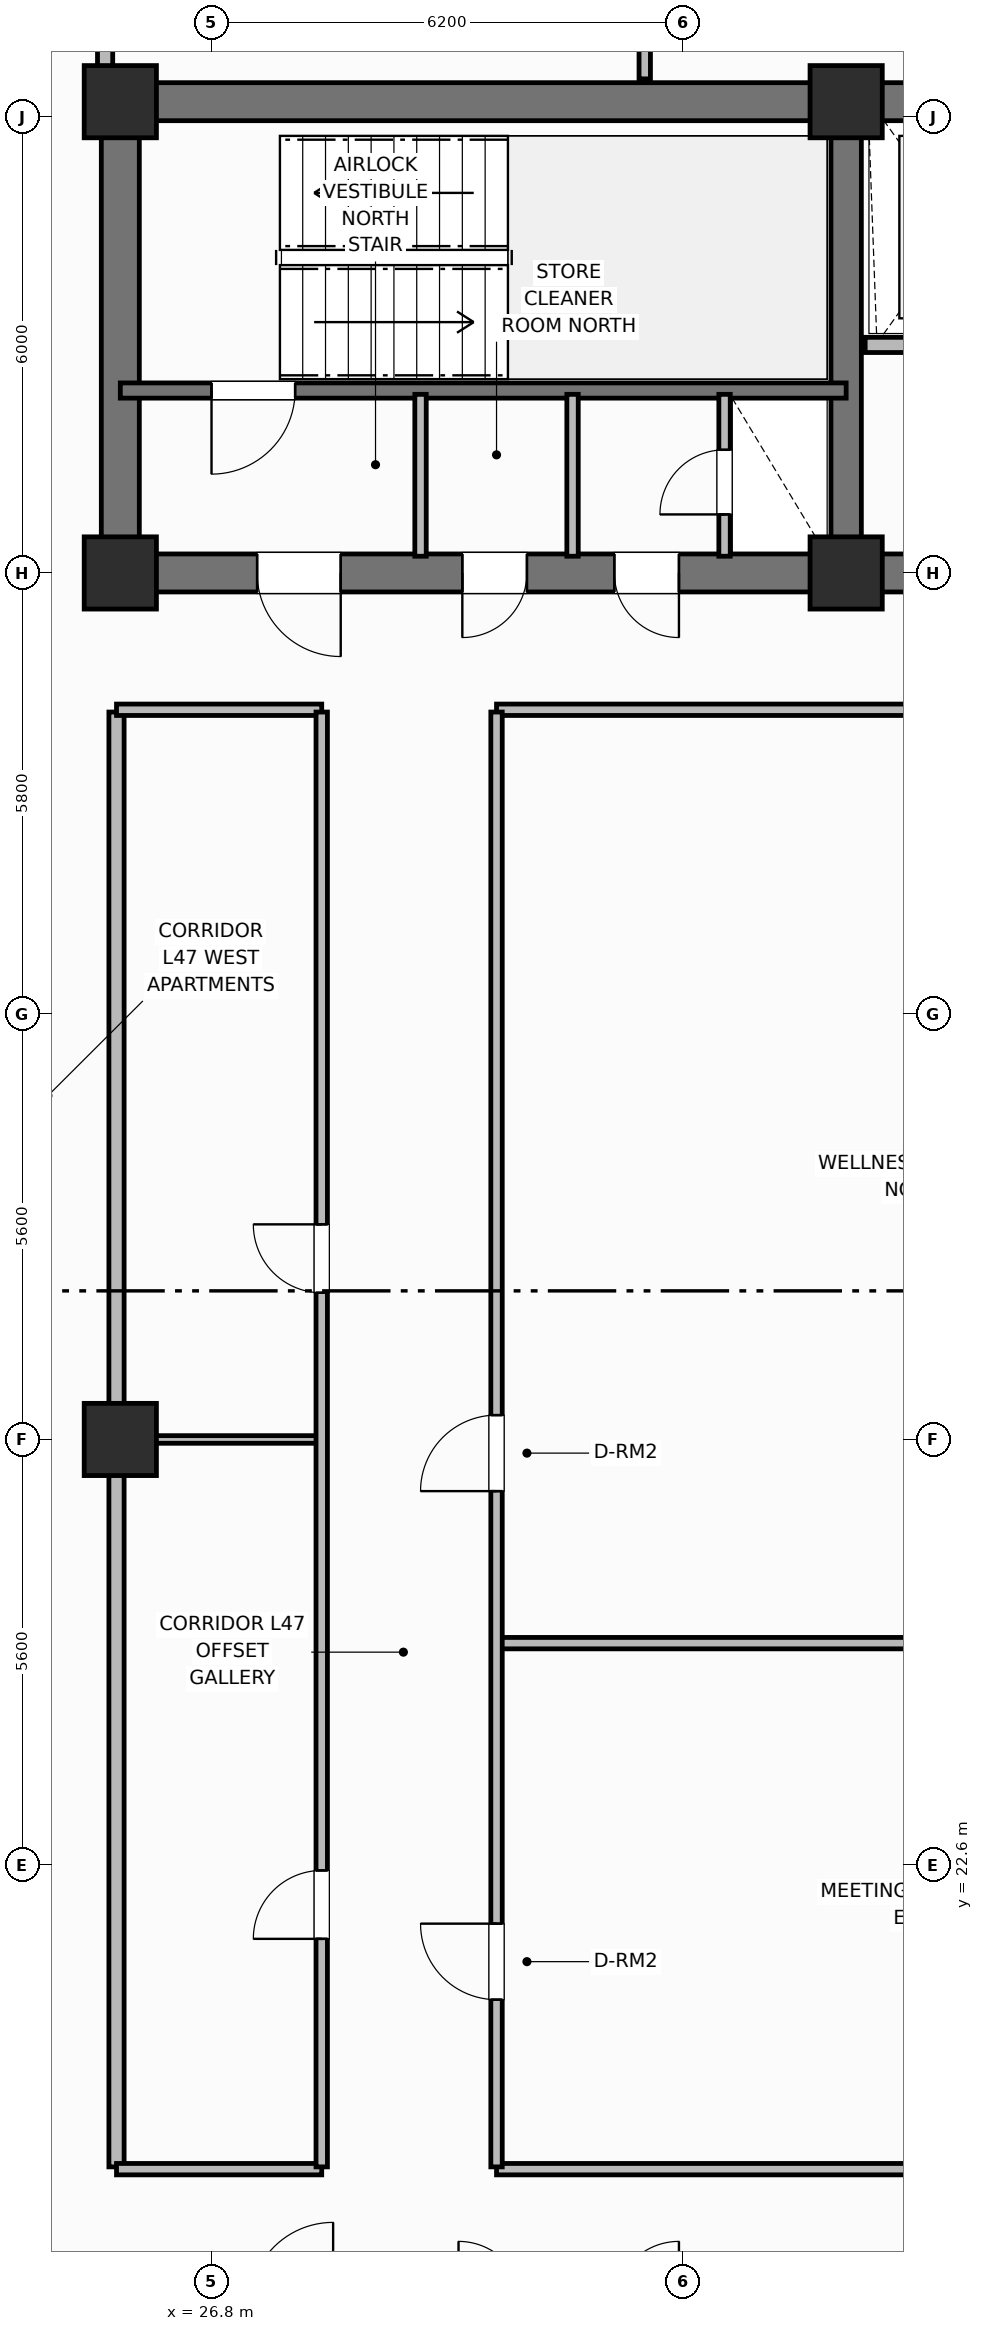
"""IFC4 building model, lengths in metres.
Left out: names, types, materials, properties, quantities, classifications, styles, units other than length and angle.
Written with IfcOpenShell. Run it as: python <this file> out.ifc"""

import sys

from ifc_helpers import new_model, si_unit, direction, frame, frame_2d, origin, origin_2d, place, context, subcontext, project, spatial, rectangle, extrude, element, fill, save


model = new_model("IFC4")
c1 = context("Model", 3, precision=1e-05, world=origin(), true_north=direction((0.0, 1.0)))
c2 = subcontext(c1, "Body", "Model", "MODEL_VIEW")
j1 = project(units=[si_unit("LENGTHUNIT", "METRE"), si_unit("PLANEANGLEUNIT", "RADIAN")], contexts=[c1])
p1 = place(None, origin())
s1 = spatial("IfcSite", under=j1, at=p1, CompositionType="ELEMENT")
p2 = place(p1, origin())
s2 = spatial("IfcBuilding", under=s1, at=p2, CompositionType="ELEMENT")
p3 = place(p2, frame((0.0, 0.0, 188.5)))
s3 = spatial("IfcBuildingStorey", under=s2, at=p3, CompositionType="ELEMENT", Elevation=188.5)
p4 = place(p3, frame((25.6, 45.8, 0.0), z_axis=(0.0, 0.0, 1.0), x_axis=(1.0, 0.0, 0.0)))
e1 = element("IfcWall", 1, at=p4, inside=s3, PredefinedType="SHEAR", context=c2, shape_type="SweptSolid", body=[
    extrude(rectangle(XDim=27.2, YDim=0.5, at=frame_2d((13.6, 0.0))), origin(), (0.0, 0.0, 1.0), 3.7),
])
p5 = place(p3, frame((25.6, 39.85, 0.0), z_axis=(0.0, 0.0, 1.0), x_axis=(0.0, 1.0, 0.0)))
e2 = element("IfcWall", 2, at=p5, inside=s3, PredefinedType="SHEAR", context=c2, shape_type="SweptSolid", body=[
    extrude(rectangle(XDim=5.7, YDim=0.5, at=frame_2d((2.85, 0.0))), origin(), (0.0, 0.0, 1.0), 3.7),
])
p6 = place(p3, frame((52.8, 39.6, 0.0), z_axis=(0.0, 0.0, 1.0), x_axis=(-1.0, 0.0, 0.0)))
e3 = element("IfcWall", 3, at=p6, inside=s3, PredefinedType="SHEAR", context=c2, shape_type="SweptSolid", body=[
    extrude(rectangle(XDim=27.2, YDim=0.5, at=frame_2d((13.6, 0.0))), origin(), (0.0, 0.0, 1.0), 3.7),
])
p7 = place(p6, frame((24.3, 0.0, 0.0)))
e4 = element("IfcOpeningElement", 4, at=p7, cuts=e3, PredefinedType="OPENING", context=c2, shape_type="SweptSolid", body=[
    extrude(rectangle(XDim=1.1, YDim=2.15, at=frame_2d((0.55, 1.075))), frame((0.0, 0.26, 0.0), z_axis=(0.0, -1.0, 0.0), x_axis=(1.0, 0.0, 0.0)), (0.0, 0.0, 1.0), 0.52),
])
p8 = place(p6, frame((21.85, 0.0, 0.0)))
e5 = element("IfcOpeningElement", 5, at=p8, cuts=e3, PredefinedType="OPENING", context=c2, shape_type="SweptSolid", body=[
    extrude(rectangle(XDim=0.85, YDim=2.1, at=frame_2d((0.425, 1.05))), frame((0.0, 0.26, 0.0), z_axis=(0.0, -1.0, 0.0), x_axis=(1.0, 0.0, 0.0)), (0.0, 0.0, 1.0), 0.52),
])
p9 = place(p6, frame((19.85, 0.0, 0.0)))
e6 = element("IfcOpeningElement", 6, at=p9, cuts=e3, PredefinedType="OPENING", context=c2, shape_type="SweptSolid", body=[
    extrude(rectangle(XDim=0.85, YDim=2.1, at=frame_2d((0.425, 1.05))), frame((0.0, 0.26, 0.0), z_axis=(0.0, -1.0, 0.0), x_axis=(1.0, 0.0, 0.0)), (0.0, 0.0, 1.0), 0.52),
])
p10 = place(p6, frame((15.1, 0.0, 0.0)))
e7 = element("IfcOpeningElement", 7, at=p10, cuts=e3, PredefinedType="OPENING", context=c2, shape_type="SweptSolid", body=[
    extrude(rectangle(XDim=1.2, YDim=2.15, at=frame_2d((0.6, 1.075))), frame((0.0, 0.26, 0.0), z_axis=(0.0, -1.0, 0.0), x_axis=(1.0, 0.0, 0.0)), (0.0, 0.0, 1.0), 0.52),
])
p11 = place(p6, frame((12.6, 0.0, 0.0)))
e8 = element("IfcOpeningElement", 8, at=p11, cuts=e3, PredefinedType="OPENING", context=c2, shape_type="SweptSolid", body=[
    extrude(rectangle(XDim=0.85, YDim=2.1, at=frame_2d((0.425, 1.05))), frame((0.0, 0.26, 0.0), z_axis=(0.0, -1.0, 0.0), x_axis=(1.0, 0.0, 0.0)), (0.0, 0.0, 1.0), 0.52),
])
p12 = place(p6, frame((10.85, 0.0, 0.0)))
e9 = element("IfcOpeningElement", 9, at=p12, cuts=e3, PredefinedType="OPENING", context=c2, shape_type="SweptSolid", body=[
    extrude(rectangle(XDim=0.85, YDim=2.1, at=frame_2d((0.425, 1.05))), frame((0.0, 0.26, 0.0), z_axis=(0.0, -1.0, 0.0), x_axis=(1.0, 0.0, 0.0)), (0.0, 0.0, 1.0), 0.52),
])
p13 = place(p6, frame((7.35, 0.0, 0.0)))
e10 = element("IfcOpeningElement", 10, at=p13, cuts=e3, PredefinedType="OPENING", context=c2, shape_type="SweptSolid", body=[
    extrude(rectangle(XDim=0.85, YDim=2.1, at=frame_2d((0.425, 1.05))), frame((0.0, 0.26, 0.0), z_axis=(0.0, -1.0, 0.0), x_axis=(1.0, 0.0, 0.0)), (0.0, 0.0, 1.0), 0.52),
])
p14 = place(p6, frame((5.35, 0.0, 0.0)))
e11 = element("IfcOpeningElement", 11, at=p14, cuts=e3, PredefinedType="OPENING", context=c2, shape_type="SweptSolid", body=[
    extrude(rectangle(XDim=0.85, YDim=2.1, at=frame_2d((0.425, 1.05))), frame((0.0, 0.26, 0.0), z_axis=(0.0, -1.0, 0.0), x_axis=(1.0, 0.0, 0.0)), (0.0, 0.0, 1.0), 0.52),
])
p15 = place(p6, frame((2.0, 0.0, 0.0)))
e12 = element("IfcOpeningElement", 12, at=p15, cuts=e3, PredefinedType="OPENING", context=c2, shape_type="SweptSolid", body=[
    extrude(rectangle(XDim=0.85, YDim=2.1, at=frame_2d((0.425, 1.05))), frame((0.0, 0.26, 0.0), z_axis=(0.0, -1.0, 0.0), x_axis=(1.0, 0.0, 0.0)), (0.0, 0.0, 1.0), 0.52),
])
p16 = place(p3, frame((35.15, 39.85, 0.0), z_axis=(0.0, 0.0, 1.0), x_axis=(0.0, 1.0, 0.0)))
e13 = element("IfcWall", 13, at=p16, inside=s3, PredefinedType="SHEAR", context=c2, shape_type="SweptSolid", body=[
    extrude(rectangle(XDim=5.7, YDim=0.4, at=frame_2d((2.85, 0.0))), origin(), (0.0, 0.0, 1.0), 3.7),
])
for number, where, z_axis, x_axis in (
    (14, (25.6, 39.6, 0.0), (0.0, 0.0, 1.0), (1.0, 0.0, 0.0)),
    (15, (25.6, 45.8, 0.0), (0.0, 0.0, 1.0), (1.0, 0.0, 0.0)),
    (16, (35.15, 39.6, 0.0), (0.0, 0.0, 1.0), (1.0, 0.0, 0.0)),
    (17, (35.15, 45.8, 0.0), (0.0, 0.0, 1.0), (1.0, 0.0, 0.0)),
    (18, (25.6, 28.2, 0.0), (0.0, 0.0, 1.0), (1.0, 0.0, 0.0)),
):
    element("IfcColumn", number, at=place(p3, frame(where, z_axis=z_axis, x_axis=x_axis)), inside=s3, PredefinedType="COLUMN", context=c2, shape_type="SweptSolid", body=[
        extrude(rectangle(XDim=0.95, YDim=0.95, at=origin_2d()), origin(), (0.0, 0.0, 1.0), 3.7),
    ])
p17 = place(p3, frame((35.15, 42.0, 0.0), z_axis=(0.0, 0.0, 1.0), x_axis=(-1.0, 0.0, 0.0)))
e19 = element("IfcWall", 19, at=p17, inside=s3, PredefinedType="SHEAR", context=c2, shape_type="SweptSolid", body=[
    extrude(rectangle(XDim=9.55, YDim=0.2, at=frame_2d((4.775, 0.0))), origin(), (0.0, 0.0, 1.0), 3.7),
])
p18 = place(p17, frame((7.25, 0.0, 0.0)))
e20 = element("IfcOpeningElement", 20, at=p18, cuts=e19, PredefinedType="OPENING", context=c2, shape_type="SweptSolid", body=[
    extrude(rectangle(XDim=1.1, YDim=2.15, at=frame_2d((0.55, 1.075))), frame((0.0, 0.11, 0.0), z_axis=(0.0, -1.0, 0.0), x_axis=(1.0, 0.0, 0.0)), (0.0, 0.0, 1.0), 0.22),
])
p19 = place(p3, frame((33.55, 39.82, 0.0), z_axis=(0.0, 0.0, 1.0), x_axis=(0.0, 1.0, 0.0)))
e21 = element("IfcWall", 21, at=p19, inside=s3, PredefinedType="PARTITIONING", context=c2, shape_type="SweptSolid", body=[
    extrude(rectangle(XDim=2.13, YDim=0.15, at=frame_2d((1.065, 0.0))), origin(), (0.0, 0.0, 1.0), 2.55),
])
p20 = place(p19, frame((0.55, 0.0, 0.0)))
e22 = element("IfcOpeningElement", 22, at=p20, cuts=e21, PredefinedType="OPENING", context=c2, shape_type="SweptSolid", body=[
    extrude(rectangle(XDim=0.85, YDim=2.05, at=frame_2d((0.425, 1.025))), frame((0.0, 0.085, 0.0), z_axis=(0.0, -1.0, 0.0), x_axis=(1.0, 0.0, 0.0)), (0.0, 0.0, 1.0), 0.17),
])
for number, where, z_axis, x_axis in (
    (23, (29.55, 39.82, 0.0), (0.0, 0.0, 1.0), (0.0, 1.0, 0.0)),
    (24, (31.55, 39.82, 0.0), (0.0, 0.0, 1.0), (0.0, 1.0, 0.0)),
):
    element("IfcWall", number, at=place(p3, frame(where, z_axis=z_axis, x_axis=x_axis)), inside=s3, PredefinedType="PARTITIONING", context=c2, shape_type="SweptSolid", body=[
        extrude(rectangle(XDim=2.13, YDim=0.15, at=frame_2d((1.065, 0.0))), origin(), (0.0, 0.0, 1.0), 2.55),
    ])
p21 = place(p3, frame((37.95, 42.6, 0.0), z_axis=(0.0, 0.0, 1.0), x_axis=(-1.0, 0.0, 0.0)))
e25 = element("IfcWall", 25, at=p21, inside=s3, PredefinedType="PARTITIONING", context=c2, shape_type="SweptSolid", body=[
    extrude(rectangle(XDim=2.55, YDim=0.2, at=frame_2d((1.275, 0.0))), origin(), (0.0, 0.0, 1.0), 2.32),
])
p22 = place(p21, frame((0.75, 0.0, 0.0)))
e26 = element("IfcOpeningElement", 26, at=p22, cuts=e25, PredefinedType="OPENING", context=c2, shape_type="SweptSolid", body=[
    extrude(rectangle(XDim=1.1, YDim=2.15, at=frame_2d((0.55, 1.075))), frame((0.0, 0.11, 0.0), z_axis=(0.0, -1.0, 0.0), x_axis=(1.0, 0.0, 0.0)), (0.0, 0.0, 1.0), 0.22),
])
p23 = place(p3, frame((25.55, 18.63, 0.0), z_axis=(0.0, 0.0, 1.0), x_axis=(0.0, 1.0, 0.0)))
e27 = element("IfcWall", 27, at=p23, inside=s3, PredefinedType="PARTITIONING", context=c2, shape_type="SweptSolid", body=[
    extrude(rectangle(XDim=19.14, YDim=0.2, at=frame_2d((9.57, 0.0))), origin(), (0.0, 0.0, 1.0), 2.55),
])
p24 = place(p3, frame((25.55, 18.6, 0.0), z_axis=(0.0, 0.0, 1.0), x_axis=(1.0, 0.0, 0.0)))
e28 = element("IfcWall", 28, at=p24, inside=s3, PredefinedType="PARTITIONING", context=c2, shape_type="SweptSolid", body=[
    extrude(rectangle(XDim=2.7, YDim=0.15, at=frame_2d((1.35, 0.0))), origin(), (0.0, 0.0, 1.0), 2.55),
])
p25 = place(p3, frame((30.55, 18.6, 0.0), z_axis=(0.0, 0.0, 1.0), x_axis=(1.0, 0.0, 0.0)))
e29 = element("IfcWall", 29, at=p25, inside=s3, PredefinedType="PARTITIONING", context=c2, shape_type="SweptSolid", body=[
    extrude(rectangle(XDim=22.3, YDim=0.15, at=frame_2d((11.15, 0.0))), origin(), (0.0, 0.0, 1.0), 2.55),
])
p26 = place(p3, frame((25.55, 37.8, 0.0), z_axis=(0.0, 0.0, 1.0), x_axis=(1.0, 0.0, 0.0)))
e30 = element("IfcWall", 30, at=p26, inside=s3, PredefinedType="PARTITIONING", context=c2, shape_type="SweptSolid", body=[
    extrude(rectangle(XDim=2.7, YDim=0.15, at=frame_2d((1.35, 0.0))), origin(), (0.0, 0.0, 1.0), 2.55),
])
p27 = place(p3, frame((30.55, 37.8, 0.0), z_axis=(0.0, 0.0, 1.0), x_axis=(1.0, 0.0, 0.0)))
e31 = element("IfcWall", 31, at=p27, inside=s3, PredefinedType="PARTITIONING", context=c2, shape_type="SweptSolid", body=[
    extrude(rectangle(XDim=22.3, YDim=0.15, at=frame_2d((11.15, 0.0))), origin(), (0.0, 0.0, 1.0), 2.55),
])
p28 = place(p3, frame((25.6, 28.2, 0.0), z_axis=(0.0, 0.0, 1.0), x_axis=(1.0, 0.0, 0.0)))
e32 = element("IfcWall", 32, at=p28, inside=s3, PredefinedType="PARTITIONING", context=c2, shape_type="SweptSolid", body=[
    extrude(rectangle(XDim=2.66, YDim=0.1, at=frame_2d((1.33, 0.0))), origin(), (0.0, 0.0, 1.0), 2.55),
])
p29 = place(p3, frame((30.58, 25.521, 0.0), z_axis=(0.0, 0.0, 1.0), x_axis=(1.0, 0.0, 0.0)))
e33 = element("IfcWall", 33, at=p29, inside=s3, PredefinedType="PARTITIONING", context=c2, shape_type="SweptSolid", body=[
    extrude(rectangle(XDim=22.22, YDim=0.15, at=frame_2d((11.11, 0.0))), origin(), (0.0, 0.0, 1.0), 2.55),
])
p30 = place(p3, frame((28.25, 18.63, 0.0), z_axis=(0.0, 0.0, 1.0), x_axis=(0.0, 1.0, 0.0)))
e34 = element("IfcWall", 34, at=p30, inside=s3, PredefinedType="PARTITIONING", context=c2, shape_type="SweptSolid", body=[
    extrude(rectangle(XDim=19.14, YDim=0.15, at=frame_2d((9.57, 0.0))), origin(), (0.0, 0.0, 1.0), 2.55),
])
p31 = place(p30, frame((3.0, 0.0, 0.0)))
e35 = element("IfcOpeningElement", 35, at=p31, cuts=e34, PredefinedType="OPENING", context=c2, shape_type="SweptSolid", body=[
    extrude(rectangle(XDim=0.9, YDim=2.1, at=frame_2d((0.45, 1.05))), frame((0.0, 0.085, 0.0), z_axis=(0.0, -1.0, 0.0), x_axis=(1.0, 0.0, 0.0)), (0.0, 0.0, 1.0), 0.17),
])
p32 = place(p30, frame((11.5, 0.0, 0.0)))
e36 = element("IfcOpeningElement", 36, at=p32, cuts=e34, PredefinedType="OPENING", context=c2, shape_type="SweptSolid", body=[
    extrude(rectangle(XDim=0.9, YDim=2.1, at=frame_2d((0.45, 1.05))), frame((0.0, 0.085, 0.0), z_axis=(0.0, -1.0, 0.0), x_axis=(1.0, 0.0, 0.0)), (0.0, 0.0, 1.0), 0.17),
])
p33 = place(p3, frame((30.55, 18.63, 0.0), z_axis=(0.0, 0.0, 1.0), x_axis=(0.0, 1.0, 0.0)))
e37 = element("IfcWall", 37, at=p33, inside=s3, PredefinedType="PARTITIONING", context=c2, shape_type="SweptSolid", body=[
    extrude(rectangle(XDim=19.14, YDim=0.15, at=frame_2d((9.57, 0.0))), origin(), (0.0, 0.0, 1.0), 2.55),
])
p34 = place(p33, frame((2.2, 0.0, 0.0)))
e38 = element("IfcOpeningElement", 38, at=p34, cuts=e37, PredefinedType="OPENING", context=c2, shape_type="SweptSolid", body=[
    extrude(rectangle(XDim=1.0, YDim=2.15, at=frame_2d((0.5, 1.075))), frame((0.0, 0.085, 0.0), z_axis=(0.0, -1.0, 0.0), x_axis=(1.0, 0.0, 0.0)), (0.0, 0.0, 1.0), 0.17),
])
p35 = place(p33, frame((8.89, 0.0, 0.0)))
e39 = element("IfcOpeningElement", 39, at=p35, cuts=e37, PredefinedType="OPENING", context=c2, shape_type="SweptSolid", body=[
    extrude(rectangle(XDim=1.0, YDim=2.15, at=frame_2d((0.5, 1.075))), frame((0.0, 0.085, 0.0), z_axis=(0.0, -1.0, 0.0), x_axis=(1.0, 0.0, 0.0)), (0.0, 0.0, 1.0), 0.17),
])
p36 = place(p3, frame((32.5, 46.1, 0.0), z_axis=(0.0, 0.0, 1.0), x_axis=(0.0, 1.0, 0.0)))
e40 = element("IfcWall", 40, at=p36, inside=s3, PredefinedType="PARTITIONING", context=c2, shape_type="SweptSolid", body=[
    extrude(rectangle(XDim=3.43, YDim=0.15, at=frame_2d((1.715, 0.0))), origin(), (0.0, 0.0, 1.0), 2.55),
])
p37 = place(p36, frame((0.85, 0.0, 0.0)))
e41 = element("IfcOpeningElement", 41, at=p37, cuts=e40, PredefinedType="OPENING", context=c2, shape_type="SweptSolid", body=[
    extrude(rectangle(XDim=0.9, YDim=2.1, at=frame_2d((0.45, 1.05))), frame((0.0, 0.085, 0.0), z_axis=(0.0, -1.0, 0.0), x_axis=(1.0, 0.0, 0.0)), (0.0, 0.0, 1.0), 0.17),
])
p38 = place(p3, frame((25.4, 46.1, 0.0), z_axis=(0.0, 0.0, 1.0), x_axis=(0.0, 1.0, 0.0)))
e42 = element("IfcWall", 42, at=p38, inside=s3, PredefinedType="PARTITIONING", context=c2, shape_type="SweptSolid", body=[
    extrude(rectangle(XDim=2.33, YDim=0.2, at=frame_2d((1.165, 0.0))), origin(), (0.0, 0.0, 1.0), 2.55),
])
p39 = place(p38, frame((0.65, 0.0, 0.0)))
e43 = element("IfcOpeningElement", 43, at=p39, cuts=e42, PredefinedType="OPENING", context=c2, shape_type="SweptSolid", body=[
    extrude(rectangle(XDim=0.9, YDim=2.1, at=frame_2d((0.45, 1.05))), frame((0.0, 0.11, 0.0), z_axis=(0.0, -1.0, 0.0), x_axis=(1.0, 0.0, 0.0)), (0.0, 0.0, 1.0), 0.22),
])
p40 = place(p18, origin())
e44 = element("IfcDoor", 44, at=p40, inside=s3, OperationType="SINGLE_SWING_RIGHT", PredefinedType="DOOR", context=c2, shape_type="SweptSolid", body=[
    extrude(rectangle(XDim=1.1, YDim=2.15, at=frame_2d((0.55, 1.075))), frame((0.0, 0.025, 0.0), z_axis=(0.0, -1.0, 0.0), x_axis=(1.0, 0.0, 0.0)), (0.0, 0.0, 1.0), 0.05),
])
fill(e20, e44)
p41 = place(p20, origin())
e45 = element("IfcDoor", 45, at=p41, inside=s3, OperationType="SINGLE_SWING_LEFT", PredefinedType="TRAPDOOR", context=c2, shape_type="SweptSolid", body=[
    extrude(rectangle(XDim=0.85, YDim=2.05, at=frame_2d((0.425, 1.025))), frame((0.0, 0.025, 0.0), z_axis=(0.0, -1.0, 0.0), x_axis=(1.0, 0.0, 0.0)), (0.0, 0.0, 1.0), 0.05),
])
fill(e22, e45)
p42 = place(p31, origin())
e46 = element("IfcDoor", 46, at=p42, inside=s3, OperationType="SINGLE_SWING_LEFT", PredefinedType="DOOR", context=c2, shape_type="SweptSolid", body=[
    extrude(rectangle(XDim=0.9, YDim=2.1, at=frame_2d((0.45, 1.05))), frame((0.0, 0.025, 0.0), z_axis=(0.0, -1.0, 0.0), x_axis=(1.0, 0.0, 0.0)), (0.0, 0.0, 1.0), 0.05),
])
fill(e35, e46)
p43 = place(p32, origin())
e47 = element("IfcDoor", 47, at=p43, inside=s3, OperationType="SINGLE_SWING_RIGHT", PredefinedType="DOOR", context=c2, shape_type="SweptSolid", body=[
    extrude(rectangle(XDim=0.9, YDim=2.1, at=frame_2d((0.45, 1.05))), frame((0.0, 0.025, 0.0), z_axis=(0.0, -1.0, 0.0), x_axis=(1.0, 0.0, 0.0)), (0.0, 0.0, 1.0), 0.05),
])
fill(e36, e47)
p44 = place(p34, origin())
e48 = element("IfcDoor", 48, at=p44, inside=s3, OperationType="SINGLE_SWING_RIGHT", PredefinedType="DOOR", context=c2, shape_type="SweptSolid", body=[
    extrude(rectangle(XDim=1.0, YDim=2.15, at=frame_2d((0.5, 1.075))), frame((0.0, 0.025, 0.0), z_axis=(0.0, -1.0, 0.0), x_axis=(1.0, 0.0, 0.0)), (0.0, 0.0, 1.0), 0.05),
])
fill(e38, e48)
p45 = place(p35, origin())
e49 = element("IfcDoor", 49, at=p45, inside=s3, OperationType="SINGLE_SWING_LEFT", PredefinedType="DOOR", context=c2, shape_type="SweptSolid", body=[
    extrude(rectangle(XDim=1.0, YDim=2.15, at=frame_2d((0.5, 1.075))), frame((0.0, 0.025, 0.0), z_axis=(0.0, -1.0, 0.0), x_axis=(1.0, 0.0, 0.0)), (0.0, 0.0, 1.0), 0.05),
])
fill(e39, e49)
p46 = place(p7, origin())
e50 = element("IfcDoor", 50, at=p46, inside=s3, OperationType="SINGLE_SWING_LEFT", PredefinedType="DOOR", context=c2, shape_type="SweptSolid", body=[
    extrude(rectangle(XDim=1.1, YDim=2.15, at=frame_2d((0.55, 1.075))), frame((0.0, 0.025, 0.0), z_axis=(0.0, -1.0, 0.0), x_axis=(1.0, 0.0, 0.0)), (0.0, 0.0, 1.0), 0.05),
])
fill(e4, e50)
p47 = place(p8, origin())
e51 = element("IfcDoor", 51, at=p47, inside=s3, OperationType="SINGLE_SWING_RIGHT", PredefinedType="DOOR", context=c2, shape_type="SweptSolid", body=[
    extrude(rectangle(XDim=0.85, YDim=2.1, at=frame_2d((0.425, 1.05))), frame((0.0, 0.025, 0.0), z_axis=(0.0, -1.0, 0.0), x_axis=(1.0, 0.0, 0.0)), (0.0, 0.0, 1.0), 0.05),
])
fill(e5, e51)
p48 = place(p9, origin())
e52 = element("IfcDoor", 52, at=p48, inside=s3, OperationType="SINGLE_SWING_LEFT", PredefinedType="DOOR", context=c2, shape_type="SweptSolid", body=[
    extrude(rectangle(XDim=0.85, YDim=2.1, at=frame_2d((0.425, 1.05))), frame((0.0, 0.025, 0.0), z_axis=(0.0, -1.0, 0.0), x_axis=(1.0, 0.0, 0.0)), (0.0, 0.0, 1.0), 0.05),
])
fill(e6, e52)
save(model, sys.argv[1])
